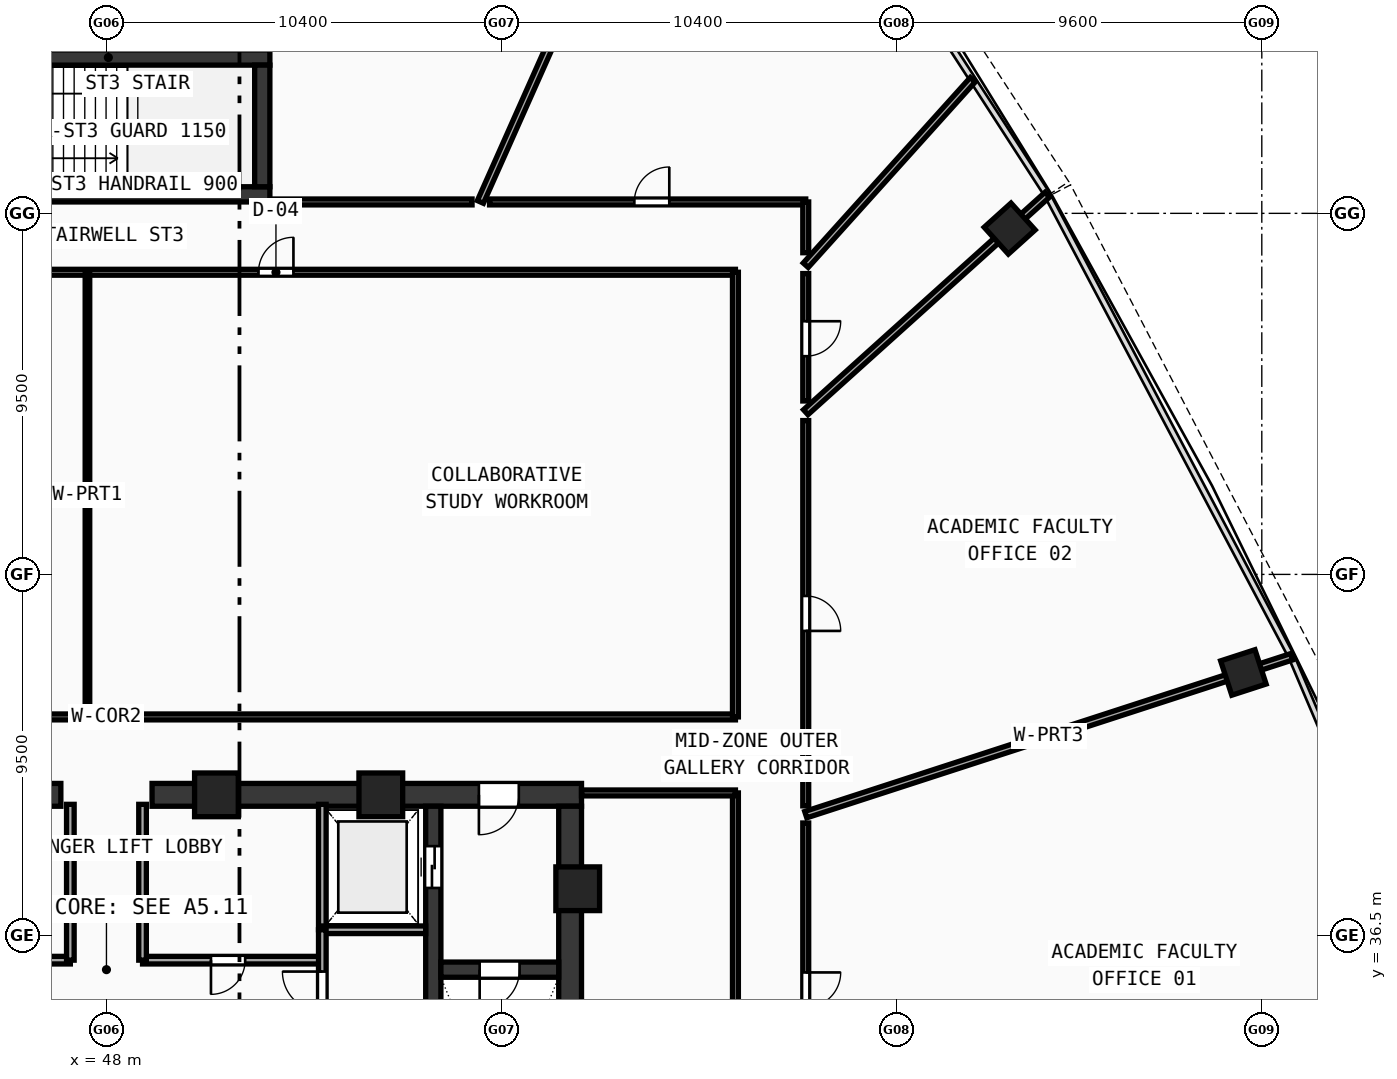
"""IFC4 building model, lengths in metres.
Left out: names, types, materials, properties, quantities, classifications, styles, units other than length and angle.
Written with IfcOpenShell. Run it as: python <this file> out.ifc"""

import sys

from ifc_helpers import new_model, si_unit, direction, frame, frame_2d, origin, origin_with_axes, origin_2d, place, context, subcontext, project, spatial, rectangle, hollow_rectangle, extrude, source, transform, mapped, element, fill, save


model = new_model("IFC4")
c1 = context("Model", 3, precision=1e-05, world=origin(), true_north=direction((0.0, 1.0)))
c2 = subcontext(c1, "Body", "Model", "MODEL_VIEW")
j1 = project(units=[si_unit("LENGTHUNIT", "METRE"), si_unit("PLANEANGLEUNIT", "RADIAN")], contexts=[c1])
p1 = place(None, origin())
s1 = spatial("IfcSite", under=j1, at=p1, CompositionType="ELEMENT")
p2 = place(p1, origin())
s2 = spatial("IfcBuilding", under=s1, at=p2, CompositionType="ELEMENT")
p3 = place(p2, frame((0.0, 0.0, 151.91)))
s3 = spatial("IfcBuildingStorey", under=s2, at=p3, CompositionType="ELEMENT", Elevation=151.91)
p4 = place(p3, frame((35.5, 40.2, 0.0), z_axis=(0.0, 0.0, 1.0), x_axis=(1.0, 0.0, 0.0)))
e1 = element("IfcWall", 1, at=p4, inside=s3, PredefinedType="SHEAR", context=c2, shape_type="SweptSolid", body=[
    extrude(rectangle(XDim=11.3, YDim=0.6, at=frame_2d((5.65, 0.0))), origin(), (0.0, 0.0, 1.0), 3.42),
])
p5 = place(p4, frame((1.65, 0.0, 0.0)))
e2 = element("IfcOpeningElement", 2, at=p5, cuts=e1, PredefinedType="OPENING", context=c2, shape_type="SweptSolid", body=[
    extrude(rectangle(XDim=1.05, YDim=2.1, at=frame_2d((0.525, 1.05))), frame((0.0, 0.31, 0.0), z_axis=(0.0, -1.0, 0.0), x_axis=(1.0, 0.0, 0.0)), (0.0, 0.0, 1.0), 0.62),
])
p6 = place(p3, frame((49.2, 40.2, 0.0), z_axis=(0.0, 0.0, 1.0), x_axis=(1.0, 0.0, 0.0)))
e3 = element("IfcWall", 3, at=p6, inside=s3, PredefinedType="SHEAR", context=c2, shape_type="SweptSolid", body=[
    extrude(rectangle(XDim=11.3, YDim=0.6, at=frame_2d((5.65, 0.0))), origin(), (0.0, 0.0, 1.0), 3.42),
])
p7 = place(p6, frame((8.6, 0.0, 0.0)))
e4 = element("IfcOpeningElement", 4, at=p7, cuts=e3, PredefinedType="OPENING", context=c2, shape_type="SweptSolid", body=[
    extrude(rectangle(XDim=1.05, YDim=2.1, at=frame_2d((0.525, 1.05))), frame((0.0, 0.31, 0.0), z_axis=(0.0, -1.0, 0.0), x_axis=(1.0, 0.0, 0.0)), (0.0, 0.0, 1.0), 0.62),
])
p8 = place(p3, frame((60.2, 27.8, 0.0), z_axis=(0.0, 0.0, 1.0), x_axis=(0.0, 1.0, 0.0)))
e5 = element("IfcWall", 5, at=p8, inside=s3, PredefinedType="SHEAR", context=c2, shape_type="SweptSolid", body=[
    extrude(rectangle(XDim=12.1, YDim=0.6, at=frame_2d((6.05, 0.0))), origin(), (0.0, 0.0, 1.0), 3.42),
])
p9 = place(p3, frame((56.6, 27.8, 0.0), z_axis=(0.0, 0.0, 1.0), x_axis=(0.0, 1.0, 0.0)))
e6 = element("IfcWall", 6, at=p9, inside=s3, PredefinedType="SHEAR", context=c2, shape_type="SweptSolid", body=[
    extrude(rectangle(XDim=12.1, YDim=0.4, at=frame_2d((6.05, 0.0))), origin(), (0.0, 0.0, 1.0), 3.42),
])
p10 = place(p9, frame((9.95, 0.0, 0.0)))
e7 = element("IfcOpeningElement", 7, at=p10, cuts=e6, PredefinedType="OPENING", context=c2, shape_type="SweptSolid", body=[
    extrude(rectangle(XDim=1.1, YDim=2.1, at=frame_2d((0.55, 1.05))), frame((0.0, 0.21, 0.0), z_axis=(0.0, -1.0, 0.0), x_axis=(1.0, 0.0, 0.0)), (0.0, 0.0, 1.0), 0.42),
])
p11 = place(p3, frame((56.8, 35.6, 0.0), z_axis=(0.0, 0.0, 1.0), x_axis=(1.0, 0.0, 0.0)))
e8 = element("IfcWall", 8, at=p11, inside=s3, PredefinedType="SHEAR", context=c2, shape_type="SweptSolid", body=[
    extrude(rectangle(XDim=3.1, YDim=0.4, at=frame_2d((1.55, 0.0))), origin(), (0.0, 0.0, 1.0), 3.42),
])
p12 = place(p11, frame((1.02, 0.0, 0.0)))
e9 = element("IfcOpeningElement", 9, at=p12, cuts=e8, PredefinedType="OPENING", context=c2, shape_type="SweptSolid", body=[
    extrude(rectangle(XDim=1.05, YDim=2.1, at=frame_2d((0.525, 1.05))), frame((0.0, 0.21, 0.0), z_axis=(0.0, -1.0, 0.0), x_axis=(1.0, 0.0, 0.0)), (0.0, 0.0, 1.0), 0.42),
])
p13 = place(p3, frame((43.8, 59.6, 0.0), z_axis=(0.0, 0.0, 1.0), x_axis=(1.0, 0.0, 0.0)))
e10 = element("IfcWall", 10, at=p13, inside=s3, PredefinedType="SHEAR", context=c2, shape_type="SweptSolid", body=[
    extrude(rectangle(XDim=8.5, YDim=0.4, at=frame_2d((4.25, 0.0))), origin(), (0.0, 0.0, 1.0), 3.42),
])
p14 = place(p3, frame((43.8, 56.0, 0.0), z_axis=(0.0, 0.0, 1.0), x_axis=(1.0, 0.0, 0.0)))
e11 = element("IfcWall", 11, at=p14, inside=s3, PredefinedType="SHEAR", context=c2, shape_type="SweptSolid", body=[
    extrude(rectangle(XDim=8.5, YDim=0.4, at=frame_2d((4.25, 0.0))), origin(), (0.0, 0.0, 1.0), 3.42),
])
p15 = place(p14, frame((0.62, 0.0, 0.0)))
e12 = element("IfcOpeningElement", 12, at=p15, cuts=e11, PredefinedType="OPENING", context=c2, shape_type="SweptSolid", body=[
    extrude(rectangle(XDim=1.05, YDim=2.1, at=frame_2d((0.525, 1.05))), frame((0.0, 0.21, 0.0), z_axis=(0.0, -1.0, 0.0), x_axis=(1.0, 0.0, 0.0)), (0.0, 0.0, 1.0), 0.42),
])
p16 = place(p3, frame((52.1, 56.2, 0.0), z_axis=(0.0, 0.0, 1.0), x_axis=(0.0, 1.0, 0.0)))
e13 = element("IfcWall", 13, at=p16, inside=s3, PredefinedType="SHEAR", context=c2, shape_type="SweptSolid", body=[
    extrude(rectangle(XDim=3.2, YDim=0.4, at=frame_2d((1.6, 0.0))), origin(), (0.0, 0.0, 1.0), 3.42),
])
m1 = source(origin(), c2, "Body", "SweptSolid", [
    extrude(hollow_rectangle(XDim=1.15, YDim=1.15, WallThickness=0.048, at=origin_2d()), origin(), (0.0, 0.0, 1.0), 3.68),
])
for number, where, z_axis, x_axis in (
    (14, (60.4, 37.729, -0.26), (0.0, 0.0, 1.0), (1.0, 0.0, 0.0)),
    (15, (55.219, 40.2, -0.26), (0.0, 0.0, 1.0), (1.0, 0.0, 0.0)),
    (16, (50.894, 40.2, -0.26), (0.0, 0.0, 1.0), (1.0, 0.0, 0.0)),
):
    element("IfcColumn", number, at=place(p3, frame(where, z_axis=z_axis, x_axis=x_axis)), inside=s3, PredefinedType="COLUMN", context=c2, shape_type="MappedRepresentation", body=[
        mapped(m1, transform((0.0, 0.0, 0.0), scale=1.0)),
    ])
m2 = source(origin(), c2, "Body", "SweptSolid", [
    extrude(hollow_rectangle(XDim=0.95, YDim=0.95, WallThickness=0.04, at=origin_2d()), origin(), (0.0, 0.0, 1.0), 3.68),
])
for number, where, z_axis, x_axis in (
    (17, (77.915, 43.42, -0.26), (0.0, 0.0, 1.0), (-0.309, 0.951, 0.0)),
    (18, (71.766, 55.099, -0.26), (0.0, 0.0, 1.0), (-0.669, 0.743, 0.0)),
):
    element("IfcColumn", number, at=place(p3, frame(where, z_axis=z_axis, x_axis=x_axis)), inside=s3, PredefinedType="COLUMN", context=c2, shape_type="MappedRepresentation", body=[
        mapped(m2, transform((0.0, 0.0, 0.0), scale=1.0)),
    ])
p17 = place(p3, frame((53.68, 36.65, 0.0), z_axis=(0.0, 0.0, 1.0), x_axis=(0.0, 1.0, 0.0)))
e19 = element("IfcWall", 19, at=p17, inside=s3, PredefinedType="SOLIDWALL", context=c2, shape_type="SweptSolid", body=[
    extrude(rectangle(XDim=3.3, YDim=0.2, at=frame_2d((1.65, 0.0))), origin(), (0.0, 0.0, 1.0), 3.42),
])
p18 = place(p3, frame((53.68, 36.65, 0.0), z_axis=(0.0, 0.0, 1.0), x_axis=(1.0, 0.0, 0.0)))
e20 = element("IfcWall", 20, at=p18, inside=s3, PredefinedType="SOLIDWALL", context=c2, shape_type="SweptSolid", body=[
    extrude(rectangle(XDim=2.72, YDim=0.2, at=frame_2d((1.36, 0.0))), origin(), (0.0, 0.0, 1.0), 3.42),
])
p19 = place(p3, frame((42.32, 35.85, 0.0), z_axis=(0.0, 0.0, 1.0), x_axis=(1.0, 0.0, 0.0)))
e21 = element("IfcWall", 21, at=p19, inside=s3, PredefinedType="SOLIDWALL", context=c2, shape_type="SweptSolid", body=[
    extrude(rectangle(XDim=4.73, YDim=0.2, at=frame_2d((2.365, 0.0))), origin(), (0.0, 0.0, 1.0), 3.42),
])
p20 = place(p19, frame((1.8, 0.0, 0.0)))
e22 = element("IfcOpeningElement", 22, at=p20, cuts=e21, PredefinedType="OPENING", context=c2, shape_type="SweptSolid", body=[
    extrude(rectangle(XDim=0.9, YDim=2.1, at=frame_2d((0.45, 1.05))), frame((0.0, 0.11, 0.0), z_axis=(0.0, -1.0, 0.0), x_axis=(1.0, 0.0, 0.0)), (0.0, 0.0, 1.0), 0.22),
])
p21 = place(p3, frame((48.95, 35.85, 0.0), z_axis=(0.0, 0.0, 1.0), x_axis=(1.0, 0.0, 0.0)))
e23 = element("IfcWall", 23, at=p21, inside=s3, PredefinedType="SOLIDWALL", context=c2, shape_type="SweptSolid", body=[
    extrude(rectangle(XDim=4.73, YDim=0.2, at=frame_2d((2.365, 0.0))), origin(), (0.0, 0.0, 1.0), 3.42),
])
p22 = place(p21, frame((1.8, 0.0, 0.0)))
e24 = element("IfcOpeningElement", 24, at=p22, cuts=e23, PredefinedType="OPENING", context=c2, shape_type="SweptSolid", body=[
    extrude(rectangle(XDim=0.9, YDim=2.1, at=frame_2d((0.45, 1.05))), frame((0.0, 0.11, 0.0), z_axis=(0.0, -1.0, 0.0), x_axis=(1.0, 0.0, 0.0)), (0.0, 0.0, 1.0), 0.22),
])
for number, where, z_axis, x_axis in (
    (25, (47.05, 35.85, 0.0), (0.0, 0.0, 1.0), (0.0, 1.0, 0.0)),
    (26, (48.95, 35.85, 0.0), (0.0, 0.0, 1.0), (0.0, 1.0, 0.0)),
):
    element("IfcWall", number, at=place(p3, frame(where, z_axis=z_axis, x_axis=x_axis)), inside=s3, PredefinedType="SOLIDWALL", context=c2, shape_type="SweptSolid", body=[
        extrude(rectangle(XDim=4.1, YDim=0.2, at=frame_2d((2.05, 0.0))), origin(), (0.0, 0.0, 1.0), 3.42),
    ])
p23 = place(p3, frame((53.68, 27.6, 0.0), z_axis=(0.0, 0.0, 1.0), x_axis=(0.0, 1.0, 0.0)))
e27 = element("IfcWall", 27, at=p23, inside=s3, PredefinedType="SOLIDWALL", context=c2, shape_type="SweptSolid", body=[
    extrude(rectangle(XDim=9.05, YDim=0.2, at=frame_2d((4.525, 0.0))), origin(), (0.0, 0.0, 1.0), 3.42),
])
p24 = place(p23, frame((6.9, 0.0, 0.0)))
e28 = element("IfcOpeningElement", 28, at=p24, cuts=e27, PredefinedType="OPENING", context=c2, shape_type="SweptSolid", body=[
    extrude(rectangle(XDim=1.05, YDim=2.1, at=frame_2d((0.525, 1.05))), frame((0.0, 0.11, 0.0), z_axis=(0.0, -1.0, 0.0), x_axis=(1.0, 0.0, 0.0)), (0.0, 0.0, 1.0), 0.22),
])
p25 = place(p3, frame((31.45, 42.25, 0.0), z_axis=(0.0, 0.0, 1.0), x_axis=(1.0, 0.0, 0.0)))
e29 = element("IfcWall", 29, at=p25, inside=s3, PredefinedType="PARTITIONING", context=c2, shape_type="SweptSolid", body=[
    extrude(rectangle(XDim=33.1, YDim=0.155, at=frame_2d((16.55, 0.0))), origin(), (0.0, 0.0, 1.0), 2.77),
])
p26 = place(p3, frame((31.45, 53.95, 0.0), z_axis=(0.0, 0.0, 1.0), x_axis=(1.0, 0.0, 0.0)))
e30 = element("IfcWall", 30, at=p26, inside=s3, PredefinedType="PARTITIONING", context=c2, shape_type="SweptSolid", body=[
    extrude(rectangle(XDim=33.1, YDim=0.155, at=frame_2d((16.55, 0.0))), origin(), (0.0, 0.0, 1.0), 2.77),
])
p27 = place(p26, frame((8.0, 0.0, 0.0)))
e31 = element("IfcOpeningElement", 31, at=p27, cuts=e30, PredefinedType="OPENING", context=c2, shape_type="SweptSolid", body=[
    extrude(rectangle(XDim=0.92, YDim=2.1, at=frame_2d((0.46, 1.05))), frame((0.0, 0.087, 0.0), z_axis=(0.0, -1.0, 0.0), x_axis=(1.0, 0.0, 0.0)), (0.0, 0.0, 1.0), 0.175),
])
p28 = place(p26, frame((20.55, 0.0, 0.0)))
e32 = element("IfcOpeningElement", 32, at=p28, cuts=e30, PredefinedType="OPENING", context=c2, shape_type="SweptSolid", body=[
    extrude(rectangle(XDim=0.92, YDim=2.1, at=frame_2d((0.46, 1.05))), frame((0.0, 0.087, 0.0), z_axis=(0.0, -1.0, 0.0), x_axis=(1.0, 0.0, 0.0)), (0.0, 0.0, 1.0), 0.175),
])
p29 = place(p3, frame((64.55, 42.25, 0.0), z_axis=(0.0, 0.0, 1.0), x_axis=(0.0, 1.0, 0.0)))
e33 = element("IfcWall", 33, at=p29, inside=s3, PredefinedType="PARTITIONING", context=c2, shape_type="SweptSolid", body=[
    extrude(rectangle(XDim=11.7, YDim=0.155, at=frame_2d((5.85, 0.0))), origin(), (0.0, 0.0, 1.0), 2.77),
])
p30 = place(p3, frame((47.5, 42.25, 0.0), z_axis=(0.0, 0.0, 1.0), x_axis=(0.0, 1.0, 0.0)))
e34 = element("IfcWall", 34, at=p30, inside=s3, PredefinedType="PARTITIONING", context=c2, shape_type="SweptSolid", body=[
    extrude(rectangle(XDim=11.7, YDim=0.12, at=frame_2d((5.85, 0.0))), origin(), (0.0, 0.0, 1.0), 3.02),
])
p31 = place(p3, frame((64.55, 23.65, 0.0), z_axis=(0.0, 0.0, 1.0), x_axis=(0.0, 1.0, 0.0)))
e35 = element("IfcWall", 35, at=p31, inside=s3, PredefinedType="PARTITIONING", context=c2, shape_type="SweptSolid", body=[
    extrude(rectangle(XDim=16.6, YDim=0.155, at=frame_2d((8.3, 0.0))), origin(), (0.0, 0.0, 1.0), 2.77),
])
p32 = place(p31, frame((7.5, 0.0, 0.0)))
e36 = element("IfcOpeningElement", 36, at=p32, cuts=e35, PredefinedType="OPENING", context=c2, shape_type="SweptSolid", body=[
    extrude(rectangle(XDim=0.9, YDim=2.08, at=frame_2d((0.45, 1.04))), frame((0.0, 0.087, 0.0), z_axis=(0.0, -1.0, 0.0), x_axis=(1.0, 0.0, 0.0)), (0.0, 0.0, 1.0), 0.175),
])
p33 = place(p3, frame((60.5, 40.25, 0.0), z_axis=(0.0, 0.0, 1.0), x_axis=(1.0, 0.0, 0.0)))
e37 = element("IfcWall", 37, at=p33, inside=s3, PredefinedType="PARTITIONING", context=c2, shape_type="SweptSolid", body=[
    extrude(rectangle(XDim=4.05, YDim=0.155, at=frame_2d((2.025, 0.0))), origin(), (0.0, 0.0, 1.0), 3.42),
])
p34 = place(p3, frame((66.4, 39.678, 0.0), z_axis=(0.0, 0.0, 1.0), x_axis=(0.951059027278, 0.309009266259, 0.0)))
e38 = element("IfcWall", 38, at=p34, inside=s3, PredefinedType="PARTITIONING", context=c2, shape_type="SweptSolid", body=[
    extrude(rectangle(XDim=13.441, YDim=0.175, at=frame_2d((6.72, 0.0))), origin(), (0.0, 0.0, 1.0), 2.77),
])
p35 = place(p3, frame((66.4, 50.267, 0.0), z_axis=(0.0, 0.0, 1.0), x_axis=(0.743147926867, 0.669127161901, 0.0)))
e39 = element("IfcWall", 39, at=p35, inside=s3, PredefinedType="PARTITIONING", context=c2, shape_type="SweptSolid", body=[
    extrude(rectangle(XDim=8.552, YDim=0.175, at=frame_2d((4.276, 0.0))), origin(), (0.0, 0.0, 1.0), 2.77),
])
p36 = place(p3, frame((66.4, 54.135, 0.0), z_axis=(0.0, 0.0, 1.0), x_axis=(0.669139250318, 0.74313704233, 0.0)))
e40 = element("IfcWall", 40, at=p36, inside=s3, PredefinedType="PARTITIONING", context=c2, shape_type="SweptSolid", body=[
    extrude(rectangle(XDim=6.569, YDim=0.175, at=frame_2d((3.284, 0.0))), origin(), (0.0, 0.0, 1.0), 2.77),
])
p37 = place(p3, frame((57.84, 55.8, 0.0), z_axis=(0.0, 0.0, 1.0), x_axis=(0.406736829456, 0.913545374661, 0.0)))
e41 = element("IfcWall", 41, at=p37, inside=s3, PredefinedType="PARTITIONING", context=c2, shape_type="SweptSolid", body=[
    extrude(rectangle(XDim=15.065, YDim=0.175, at=frame_2d((7.532, 0.0))), origin(), (0.0, 0.0, 1.0), 2.77),
])
p38 = place(p3, frame((52.391, 55.8, 0.0), z_axis=(0.0, 0.0, 1.0), x_axis=(1.0, 0.0, 0.0)))
e42 = element("IfcWall", 42, at=p38, inside=s3, PredefinedType="PARTITIONING", context=c2, shape_type="SweptSolid", body=[
    extrude(rectangle(XDim=5.229, YDim=0.155, at=frame_2d((2.614, 0.0))), origin(), (0.0, 0.0, 1.0), 2.77),
])
p39 = place(p3, frame((58.08, 55.8, 0.0), z_axis=(0.0, 0.0, 1.0), x_axis=(1.0, 0.0, 0.0)))
e43 = element("IfcWall", 43, at=p39, inside=s3, PredefinedType="PARTITIONING", context=c2, shape_type="SweptSolid", body=[
    extrude(rectangle(XDim=8.32, YDim=0.155, at=frame_2d((4.16, 0.0))), origin(), (0.0, 0.0, 1.0), 3.02),
])
p40 = place(p39, frame((3.809, 0.0, 0.0)))
e44 = element("IfcOpeningElement", 44, at=p40, cuts=e43, PredefinedType="OPENING", context=c2, shape_type="SweptSolid", body=[
    extrude(rectangle(XDim=0.92, YDim=2.1, at=frame_2d((0.46, 1.05))), frame((0.0, 0.087, 0.0), z_axis=(0.0, -1.0, 0.0), x_axis=(1.0, 0.0, 0.0)), (0.0, 0.0, 1.0), 0.175),
])
p41 = place(p3, frame((66.4, 55.8, 0.0), z_axis=(0.0, 0.0, 1.0), x_axis=(0.0, -1.0, 0.0)))
e45 = element("IfcWall", 45, at=p41, inside=s3, PredefinedType="PARTITIONING", context=c2, shape_type="SweptSolid", body=[
    extrude(rectangle(XDim=1.336, YDim=0.155, at=frame_2d((0.668, 0.0))), origin(), (0.0, 0.0, 1.0), 3.42),
])
p42 = place(p3, frame((66.4, 53.916, 0.0), z_axis=(0.0, 0.0, 1.0), x_axis=(0.0, -1.0, 0.0)))
e46 = element("IfcWall", 46, at=p42, inside=s3, PredefinedType="PARTITIONING", context=c2, shape_type="SweptSolid", body=[
    extrude(rectangle(XDim=3.352, YDim=0.155, at=frame_2d((1.676, 0.0))), origin(), (0.0, 0.0, 1.0), 3.02),
])
p43 = place(p42, frame((1.254, 0.0, 0.0)))
e47 = element("IfcOpeningElement", 47, at=p43, cuts=e46, PredefinedType="OPENING", context=c2, shape_type="SweptSolid", body=[
    extrude(rectangle(XDim=0.92, YDim=2.1, at=frame_2d((0.46, 1.05))), frame((0.0, 0.087, 0.0), z_axis=(0.0, -1.0, 0.0), x_axis=(1.0, 0.0, 0.0)), (0.0, 0.0, 1.0), 0.175),
])
p44 = place(p3, frame((66.4, 50.048, 0.0), z_axis=(0.0, 0.0, 1.0), x_axis=(0.0, -1.0, 0.0)))
e48 = element("IfcWall", 48, at=p44, inside=s3, PredefinedType="PARTITIONING", context=c2, shape_type="SweptSolid", body=[
    extrude(rectangle(XDim=10.138, YDim=0.155, at=frame_2d((5.069, 0.0))), origin(), (0.0, 0.0, 1.0), 2.77),
])
p45 = place(p44, frame((4.615, 0.0, 0.0)))
e49 = element("IfcOpeningElement", 49, at=p45, cuts=e48, PredefinedType="OPENING", context=c2, shape_type="SweptSolid", body=[
    extrude(rectangle(XDim=0.92, YDim=2.1, at=frame_2d((0.46, 1.05))), frame((0.0, 0.087, 0.0), z_axis=(0.0, -1.0, 0.0), x_axis=(1.0, 0.0, 0.0)), (0.0, 0.0, 1.0), 0.175),
])
p46 = place(p3, frame((66.4, 39.459, 0.0), z_axis=(0.0, 0.0, 1.0), x_axis=(0.0, -1.0, 0.0)))
e50 = element("IfcWall", 50, at=p46, inside=s3, PredefinedType="PARTITIONING", context=c2, shape_type="SweptSolid", body=[
    extrude(rectangle(XDim=8.783, YDim=0.155, at=frame_2d((4.392, 0.0))), origin(), (0.0, 0.0, 1.0), 3.42),
])
p47 = place(p46, frame((3.932, 0.0, 0.0)))
e51 = element("IfcOpeningElement", 51, at=p47, cuts=e50, PredefinedType="OPENING", context=c2, shape_type="SweptSolid", body=[
    extrude(rectangle(XDim=0.92, YDim=2.1, at=frame_2d((0.46, 1.05))), frame((0.0, 0.087, 0.0), z_axis=(0.0, -1.0, 0.0), x_axis=(1.0, 0.0, 0.0)), (0.0, 0.0, 1.0), 0.175),
])
m3 = source(origin(), c2, "Body", "SweptSolid", [
    extrude(rectangle(XDim=1.05, YDim=2.1, at=frame_2d((0.525, 1.05))), frame((0.0, 0.025, 0.0), z_axis=(0.0, -1.0, 0.0), x_axis=(1.0, 0.0, 0.0)), (0.0, 0.0, 1.0), 0.05),
])
p48 = place(p12, frame((1.05, 0.0, 0.0), z_axis=(0.0, 0.0, 1.0), x_axis=(-1.0, 0.0, 0.0)))
e52 = element("IfcDoor", 52, at=p48, inside=s3, OperationType="SINGLE_SWING_RIGHT", PredefinedType="DOOR", context=c2, shape_type="MappedRepresentation", body=[
    mapped(m3, transform((0.0, 0.0, 0.0), scale=1.0)),
])
fill(e9, e52)
p49 = place(p7, frame((1.05, 0.0, 0.0), z_axis=(0.0, 0.0, 1.0), x_axis=(-1.0, 0.0, 0.0)))
e53 = element("IfcDoor", 53, at=p49, inside=s3, OperationType="SINGLE_SWING_RIGHT", PredefinedType="DOOR", context=c2, shape_type="MappedRepresentation", body=[
    mapped(m3, transform((0.0, 0.0, 0.0), scale=1.0)),
])
fill(e4, e53)
m4 = source(origin(), c2, "Body", "SweptSolid", [
    extrude(rectangle(XDim=1.1, YDim=2.1, at=frame_2d((0.55, 1.05))), frame((0.0, 0.025, 0.0), z_axis=(0.0, -1.0, 0.0), x_axis=(1.0, 0.0, 0.0)), (0.0, 0.0, 1.0), 0.05),
])
p50 = place(p10, origin_with_axes())
e54 = element("IfcDoor", 54, at=p50, inside=s3, OperationType="DOUBLE_DOOR_SLIDING", PredefinedType="DOOR", context=c2, shape_type="MappedRepresentation", body=[
    mapped(m4, transform((0.0, 0.0, 0.0), scale=1.0)),
])
fill(e7, e54)
m5 = source(origin(), c2, "Body", "SweptSolid", [
    extrude(rectangle(XDim=0.9, YDim=2.1, at=frame_2d((0.45, 1.05))), frame((0.0, 0.025, 0.0), z_axis=(0.0, -1.0, 0.0), x_axis=(1.0, 0.0, 0.0)), (0.0, 0.0, 1.0), 0.05),
])
p51 = place(p22, frame((0.9, 0.0, 0.0), z_axis=(0.0, 0.0, 1.0), x_axis=(-1.0, 0.0, 0.0)))
e55 = element("IfcDoor", 55, at=p51, inside=s3, OperationType="SINGLE_SWING_RIGHT", PredefinedType="DOOR", context=c2, shape_type="MappedRepresentation", body=[
    mapped(m5, transform((0.0, 0.0, 0.0), scale=1.0)),
])
fill(e24, e55)
p52 = place(p24, origin_with_axes())
e56 = element("IfcDoor", 56, at=p52, inside=s3, OperationType="SINGLE_SWING_RIGHT", PredefinedType="DOOR", context=c2, shape_type="MappedRepresentation", body=[
    mapped(m3, transform((0.0, 0.0, 0.0), scale=1.0)),
])
fill(e28, e56)
m6 = source(origin(), c2, "Body", "SweptSolid", [
    extrude(rectangle(XDim=0.92, YDim=2.1, at=frame_2d((0.46, 1.05))), frame((0.0, 0.025, 0.0), z_axis=(0.0, -1.0, 0.0), x_axis=(1.0, 0.0, 0.0)), (0.0, 0.0, 1.0), 0.05),
])
p53 = place(p28, origin_with_axes())
e57 = element("IfcDoor", 57, at=p53, inside=s3, OperationType="SINGLE_SWING_RIGHT", PredefinedType="DOOR", context=c2, shape_type="MappedRepresentation", body=[
    mapped(m6, transform((0.0, 0.0, 0.0), scale=1.0)),
])
fill(e32, e57)
p54 = place(p47, origin_with_axes())
e58 = element("IfcDoor", 58, at=p54, inside=s3, OperationType="SINGLE_SWING_LEFT", PredefinedType="DOOR", context=c2, shape_type="MappedRepresentation", body=[
    mapped(m6, transform((0.0, 0.0, 0.0), scale=1.0)),
])
fill(e51, e58)
p55 = place(p45, origin_with_axes())
e59 = element("IfcDoor", 59, at=p55, inside=s3, OperationType="SINGLE_SWING_RIGHT", PredefinedType="DOOR", context=c2, shape_type="MappedRepresentation", body=[
    mapped(m6, transform((0.0, 0.0, 0.0), scale=1.0)),
])
fill(e49, e59)
p56 = place(p43, origin_with_axes())
e60 = element("IfcDoor", 60, at=p56, inside=s3, OperationType="SINGLE_SWING_LEFT", PredefinedType="DOOR", context=c2, shape_type="MappedRepresentation", body=[
    mapped(m6, transform((0.0, 0.0, 0.0), scale=1.0)),
])
fill(e47, e60)
p57 = place(p40, origin_with_axes())
e61 = element("IfcDoor", 61, at=p57, inside=s3, OperationType="SINGLE_SWING_RIGHT", PredefinedType="DOOR", context=c2, shape_type="MappedRepresentation", body=[
    mapped(m6, transform((0.0, 0.0, 0.0), scale=1.0)),
])
fill(e44, e61)
save(model, sys.argv[1])
